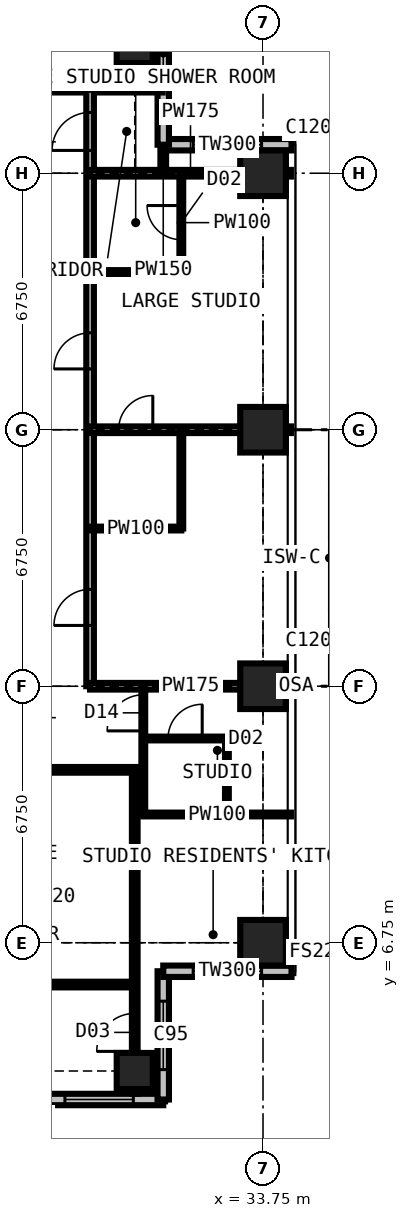
"""IFC4 building model, lengths in metres.
Left out: names, types, materials, properties, quantities, classifications, styles, units other than length and angle.
Written with IfcOpenShell. Run it as: python <this file> out.ifc"""

import sys

from ifc_helpers import new_model, si_unit, direction, frame, frame_2d, origin, origin_2d, place, context, subcontext, project, spatial, rectangle, extrude, element, fill, save


model = new_model("IFC4")
c1 = context("Model", 3, precision=1e-05, world=origin(), true_north=direction((0.0, 1.0)))
c2 = subcontext(c1, "Body", "Model", "MODEL_VIEW")
j1 = project(units=[si_unit("LENGTHUNIT", "METRE"), si_unit("PLANEANGLEUNIT", "RADIAN")], contexts=[c1])
p1 = place(None, origin())
s1 = spatial("IfcSite", under=j1, at=p1, CompositionType="ELEMENT")
p2 = place(p1, origin())
s2 = spatial("IfcBuilding", under=s1, at=p2, CompositionType="ELEMENT")
p3 = place(p2, frame((0.0, 0.0, 174.6)))
s3 = spatial("IfcBuildingStorey", under=s2, at=p3, CompositionType="ELEMENT", Elevation=174.6)
for number, where, z_axis, x_axis in (
    (1, (30.375, 3.375, 0.0), (0.0, 0.0, 1.0), (1.0, 0.0, 0.0)),
    (2, (30.375, 30.375, 0.0), (0.0, 0.0, 1.0), (1.0, 0.0, 0.0)),
):
    element("IfcColumn", number, at=place(p3, frame(where, z_axis=z_axis, x_axis=x_axis)), inside=s3, PredefinedType="COLUMN", context=c2, shape_type="SweptSolid", body=[
        extrude(rectangle(XDim=0.95, YDim=0.95, at=origin_2d()), origin(), (0.0, 0.0, 1.0), 3.6),
    ])
for number, where, z_axis, x_axis in (
    (3, (33.75, 6.75, 0.0), (0.0, 0.0, 1.0), (1.0, 0.0, 0.0)),
    (4, (33.75, 13.5, 0.0), (0.0, 0.0, 1.0), (1.0, 0.0, 0.0)),
    (5, (33.75, 20.25, 0.0), (0.0, 0.0, 1.0), (1.0, 0.0, 0.0)),
    (6, (33.75, 27.0, 0.0), (0.0, 0.0, 1.0), (1.0, 0.0, 0.0)),
):
    element("IfcColumn", number, at=place(p3, frame(where, z_axis=z_axis, x_axis=x_axis)), inside=s3, PredefinedType="COLUMN", context=c2, shape_type="SweptSolid", body=[
        extrude(rectangle(XDim=1.2, YDim=1.2, at=origin_2d()), origin(), (0.0, 0.0, 1.0), 3.6),
    ])
p4 = place(p3, frame((34.5, 27.75, 0.0), z_axis=(0.0, 0.0, 1.0), x_axis=(-1.0, 0.0, 0.0)))
e7 = element("IfcWall", 7, at=p4, inside=s3, PredefinedType="SOLIDWALL", context=c2, shape_type="SweptSolid", body=[
    extrude(rectangle(XDim=3.375, YDim=0.3, at=frame_2d((1.688, 0.0))), origin(), (0.0, 0.0, 1.0), 3.375),
])
p5 = place(p4, frame((0.788, 0.0, 0.6)))
e8 = element("IfcOpeningElement", 8, at=p5, cuts=e7, PredefinedType="OPENING", context=c2, shape_type="SweptSolid", body=[
    extrude(rectangle(XDim=1.8, YDim=2.1, at=frame_2d((0.9, 1.05))), frame((0.0, 0.16, 0.0), z_axis=(0.0, -1.0, 0.0), x_axis=(1.0, 0.0, 0.0)), (0.0, 0.0, 1.0), 0.32),
])
p6 = place(p3, frame((31.125, 27.75, 0.0), z_axis=(0.0, 0.0, 1.0), x_axis=(0.0, 1.0, 0.0)))
e9 = element("IfcWall", 9, at=p6, inside=s3, PredefinedType="SOLIDWALL", context=c2, shape_type="SweptSolid", body=[
    extrude(rectangle(XDim=3.375, YDim=0.3, at=frame_2d((1.688, 0.0))), origin(), (0.0, 0.0, 1.0), 3.375),
])
p7 = place(p6, frame((1.663, 0.0, 0.9)))
e10 = element("IfcOpeningElement", 10, at=p7, cuts=e9, PredefinedType="OPENING", context=c2, shape_type="SweptSolid", body=[
    extrude(rectangle(XDim=1.5, YDim=1.8, at=frame_2d((0.75, 0.9))), frame((0.0, 0.16, 0.0), z_axis=(0.0, -1.0, 0.0), x_axis=(1.0, 0.0, 0.0)), (0.0, 0.0, 1.0), 0.32),
])
p8 = place(p3, frame((27.75, 2.625, 0.0), z_axis=(0.0, 0.0, 1.0), x_axis=(1.0, 0.0, 0.0)))
e11 = element("IfcWall", 11, at=p8, inside=s3, PredefinedType="SOLIDWALL", context=c2, shape_type="SweptSolid", body=[
    extrude(rectangle(XDim=3.375, YDim=0.3, at=frame_2d((1.688, 0.0))), origin(), (0.0, 0.0, 1.0), 3.375),
])
p9 = place(p8, frame((0.788, 0.0, 0.6)))
e12 = element("IfcOpeningElement", 12, at=p9, cuts=e11, PredefinedType="OPENING", context=c2, shape_type="SweptSolid", body=[
    extrude(rectangle(XDim=1.8, YDim=2.1, at=frame_2d((0.9, 1.05))), frame((0.0, 0.16, 0.0), z_axis=(0.0, -1.0, 0.0), x_axis=(1.0, 0.0, 0.0)), (0.0, 0.0, 1.0), 0.32),
])
p10 = place(p3, frame((31.125, 2.625, 0.0), z_axis=(0.0, 0.0, 1.0), x_axis=(0.0, 1.0, 0.0)))
e13 = element("IfcWall", 13, at=p10, inside=s3, PredefinedType="SOLIDWALL", context=c2, shape_type="SweptSolid", body=[
    extrude(rectangle(XDim=3.375, YDim=0.3, at=frame_2d((1.688, 0.0))), origin(), (0.0, 0.0, 1.0), 3.375),
])
p11 = place(p10, frame((0.788, 0.0, 0.6)))
e14 = element("IfcOpeningElement", 14, at=p11, cuts=e13, PredefinedType="OPENING", context=c2, shape_type="SweptSolid", body=[
    extrude(rectangle(XDim=1.8, YDim=2.1, at=frame_2d((0.9, 1.05))), frame((0.0, 0.16, 0.0), z_axis=(0.0, -1.0, 0.0), x_axis=(1.0, 0.0, 0.0)), (0.0, 0.0, 1.0), 0.32),
])
p12 = place(p3, frame((31.125, 6.0, 0.0), z_axis=(0.0, 0.0, 1.0), x_axis=(1.0, 0.0, 0.0)))
e15 = element("IfcWall", 15, at=p12, inside=s3, PredefinedType="SOLIDWALL", context=c2, shape_type="SweptSolid", body=[
    extrude(rectangle(XDim=3.375, YDim=0.3, at=frame_2d((1.688, 0.0))), origin(), (0.0, 0.0, 1.0), 3.375),
])
p13 = place(p12, frame((0.788, 0.0, 0.6)))
e16 = element("IfcOpeningElement", 16, at=p13, cuts=e15, PredefinedType="OPENING", context=c2, shape_type="SweptSolid", body=[
    extrude(rectangle(XDim=1.8, YDim=2.1, at=frame_2d((0.9, 1.05))), frame((0.0, 0.16, 0.0), z_axis=(0.0, -1.0, 0.0), x_axis=(1.0, 0.0, 0.0)), (0.0, 0.0, 1.0), 0.32),
])
p14 = place(p3, frame((10.125, 11.3, 0.0), z_axis=(0.0, 0.0, 1.0), x_axis=(1.0, 0.0, 0.0)))
e17 = element("IfcWall", 17, at=p14, inside=s3, PredefinedType="PARTITIONING", context=c2, shape_type="SweptSolid", body=[
    extrude(rectangle(XDim=20.475, YDim=0.15, at=frame_2d((10.238, 0.0))), origin(), (0.0, 0.0, 1.0), 3.375),
])
p15 = place(p14, frame((8.425, 0.0, 0.0)))
e18 = element("IfcOpeningElement", 18, at=p15, cuts=e17, PredefinedType="OPENING", context=c2, shape_type="SweptSolid", body=[
    extrude(rectangle(XDim=1.0, YDim=2.2, at=frame_2d((0.5, 1.1))), frame((0.0, 0.085, 0.0), z_axis=(0.0, -1.0, 0.0), x_axis=(1.0, 0.0, 0.0)), (0.0, 0.0, 1.0), 0.17),
])
p16 = place(p14, frame((10.975, 0.0, 0.0)))
e19 = element("IfcOpeningElement", 19, at=p16, cuts=e17, PredefinedType="OPENING", context=c2, shape_type="SweptSolid", body=[
    extrude(rectangle(XDim=1.0, YDim=2.2, at=frame_2d((0.5, 1.1))), frame((0.0, 0.085, 0.0), z_axis=(0.0, -1.0, 0.0), x_axis=(1.0, 0.0, 0.0)), (0.0, 0.0, 1.0), 0.17),
])
p17 = place(p14, frame((4.875, 0.0, 0.0)))
e20 = element("IfcOpeningElement", 20, at=p17, cuts=e17, PredefinedType="OPENING", context=c2, shape_type="SweptSolid", body=[
    extrude(rectangle(XDim=0.95, YDim=2.2, at=frame_2d((0.475, 1.1))), frame((0.0, 0.085, 0.0), z_axis=(0.0, -1.0, 0.0), x_axis=(1.0, 0.0, 0.0)), (0.0, 0.0, 1.0), 0.17),
])
p18 = place(p3, frame((11.3, 29.2, 0.0), z_axis=(0.0, 0.0, 1.0), x_axis=(1.0, 0.0, 0.0)))
e21 = element("IfcWall", 21, at=p18, inside=s3, PredefinedType="PARTITIONING", context=c2, shape_type="SweptSolid", body=[
    extrude(rectangle(XDim=19.809, YDim=0.15, at=frame_2d((9.904, 0.0))), origin(), (0.0, 0.0, 1.0), 3.375),
])
p19 = place(p18, frame((12.9, 0.0, 0.0)))
e22 = element("IfcOpeningElement", 22, at=p19, cuts=e21, PredefinedType="OPENING", context=c2, shape_type="SweptSolid", body=[
    extrude(rectangle(XDim=1.0, YDim=2.2, at=frame_2d((0.5, 1.1))), frame((0.0, 0.085, 0.0), z_axis=(0.0, -1.0, 0.0), x_axis=(1.0, 0.0, 0.0)), (0.0, 0.0, 1.0), 0.17),
])
p20 = place(p18, frame((6.4, 0.0, 0.0)))
e23 = element("IfcOpeningElement", 23, at=p20, cuts=e21, PredefinedType="OPENING", context=c2, shape_type="SweptSolid", body=[
    extrude(rectangle(XDim=0.95, YDim=2.2, at=frame_2d((0.475, 1.1))), frame((0.0, 0.085, 0.0), z_axis=(0.0, -1.0, 0.0), x_axis=(1.0, 0.0, 0.0)), (0.0, 0.0, 1.0), 0.17),
])
p21 = place(p18, frame((0.6, 0.0, 0.0)))
e24 = element("IfcOpeningElement", 24, at=p21, cuts=e21, PredefinedType="OPENING", context=c2, shape_type="SweptSolid", body=[
    extrude(rectangle(XDim=1.0, YDim=2.2, at=frame_2d((0.5, 1.1))), frame((0.0, 0.085, 0.0), z_axis=(0.0, -1.0, 0.0), x_axis=(1.0, 0.0, 0.0)), (0.0, 0.0, 1.0), 0.17),
])
p22 = place(p3, frame((22.988, 5.65, 0.0), z_axis=(0.0, 0.0, 1.0), x_axis=(1.0, 0.0, 0.0)))
e25 = element("IfcWall", 25, at=p22, inside=s3, PredefinedType="PARTITIONING", context=c2, shape_type="SweptSolid", body=[
    extrude(rectangle(XDim=7.387, YDim=0.15, at=frame_2d((3.694, 0.0))), origin(), (0.0, 0.0, 1.0), 3.375),
])
p23 = place(p22, frame((2.45, 0.0, 0.0)))
e26 = element("IfcOpeningElement", 26, at=p23, cuts=e25, PredefinedType="OPENING", context=c2, shape_type="SweptSolid", body=[
    extrude(rectangle(XDim=0.95, YDim=2.2, at=frame_2d((0.475, 1.1))), frame((0.0, 0.085, 0.0), z_axis=(0.0, -1.0, 0.0), x_axis=(1.0, 0.0, 0.0)), (0.0, 0.0, 1.0), 0.17),
])
p24 = place(p3, frame((29.2, 13.5, 0.0), z_axis=(0.0, 0.0, 1.0), x_axis=(0.0, 1.0, 0.0)))
e27 = element("IfcWall", 27, at=p24, inside=s3, PredefinedType="PARTITIONING", context=c2, shape_type="SweptSolid", body=[
    extrude(rectangle(XDim=15.7, YDim=0.2, at=frame_2d((7.85, 0.0))), origin(), (0.0, 0.0, 1.0), 3.375),
])
p25 = place(p24, frame((8.35, 0.0, 0.0)))
e28 = element("IfcOpeningElement", 28, at=p25, cuts=e27, PredefinedType="OPENING", context=c2, shape_type="SweptSolid", body=[
    extrude(rectangle(XDim=0.95, YDim=2.2, at=frame_2d((0.475, 1.1))), frame((0.0, 0.11, 0.0), z_axis=(0.0, -1.0, 0.0), x_axis=(1.0, 0.0, 0.0)), (0.0, 0.0, 1.0), 0.22),
])
p26 = place(p24, frame((1.6, 0.0, 0.0)))
e29 = element("IfcOpeningElement", 29, at=p26, cuts=e27, PredefinedType="OPENING", context=c2, shape_type="SweptSolid", body=[
    extrude(rectangle(XDim=0.95, YDim=2.2, at=frame_2d((0.475, 1.1))), frame((0.0, 0.11, 0.0), z_axis=(0.0, -1.0, 0.0), x_axis=(1.0, 0.0, 0.0)), (0.0, 0.0, 1.0), 0.22),
])
p27 = place(p24, frame((14.1, 0.0, 0.0)))
e30 = element("IfcOpeningElement", 30, at=p27, cuts=e27, PredefinedType="OPENING", context=c2, shape_type="SweptSolid", body=[
    extrude(rectangle(XDim=1.0, YDim=2.2, at=frame_2d((0.5, 1.1))), frame((0.0, 0.11, 0.0), z_axis=(0.0, -1.0, 0.0), x_axis=(1.0, 0.0, 0.0)), (0.0, 0.0, 1.0), 0.22),
])
p28 = place(p3, frame((29.2, 13.5, 0.0), z_axis=(0.0, 0.0, 1.0), x_axis=(1.0, 0.0, 0.0)))
e31 = element("IfcWall", 31, at=p28, inside=s3, PredefinedType="PARTITIONING", context=c2, shape_type="SweptSolid", body=[
    extrude(rectangle(XDim=5.284, YDim=0.175, at=frame_2d((2.642, 0.0))), origin(), (0.0, 0.0, 1.0), 2.61),
])
p29 = place(p3, frame((29.2, 17.65, 0.0), z_axis=(0.0, 0.0, 1.0), x_axis=(1.0, 0.0, 0.0)))
e32 = element("IfcWall", 32, at=p29, inside=s3, PredefinedType="PARTITIONING", context=c2, shape_type="SweptSolid", body=[
    extrude(rectangle(XDim=2.4, YDim=0.1, at=frame_2d((1.2, 0.0))), origin(), (0.0, 0.0, 1.0), 3.375),
])
p30 = place(p3, frame((29.2, 20.25, 0.0), z_axis=(0.0, 0.0, 1.0), x_axis=(1.0, 0.0, 0.0)))
e33 = element("IfcWall", 33, at=p30, inside=s3, PredefinedType="PARTITIONING", context=c2, shape_type="SweptSolid", body=[
    extrude(rectangle(XDim=5.284, YDim=0.175, at=frame_2d((2.642, 0.0))), origin(), (0.0, 0.0, 1.0), 2.61),
])
p31 = place(p30, frame((0.75, 0.0, 0.0)))
e34 = element("IfcOpeningElement", 34, at=p31, cuts=e33, PredefinedType="OPENING", context=c2, shape_type="SweptSolid", body=[
    extrude(rectangle(XDim=0.9, YDim=2.2, at=frame_2d((0.45, 1.1))), frame((0.0, 0.097, 0.0), z_axis=(0.0, -1.0, 0.0), x_axis=(1.0, 0.0, 0.0)), (0.0, 0.0, 1.0), 0.195),
])
p32 = place(p3, frame((29.2, 24.4, 0.0), z_axis=(0.0, 0.0, 1.0), x_axis=(1.0, 0.0, 0.0)))
e35 = element("IfcWall", 35, at=p32, inside=s3, PredefinedType="PARTITIONING", context=c2, shape_type="SweptSolid", body=[
    extrude(rectangle(XDim=2.4, YDim=0.1, at=frame_2d((1.2, 0.0))), origin(), (0.0, 0.0, 1.0), 3.375),
])
p33 = place(p3, frame((29.2, 27.0, 0.0), z_axis=(0.0, 0.0, 1.0), x_axis=(1.0, 0.0, 0.0)))
e36 = element("IfcWall", 36, at=p33, inside=s3, PredefinedType="PARTITIONING", context=c2, shape_type="SweptSolid", body=[
    extrude(rectangle(XDim=5.284, YDim=0.175, at=frame_2d((2.642, 0.0))), origin(), (0.0, 0.0, 1.0), 2.806),
])
p34 = place(p3, frame((30.375, 2.775, 0.0), z_axis=(0.0, 0.0, 1.0), x_axis=(0.0, 1.0, 0.0)))
e37 = element("IfcWall", 37, at=p34, inside=s3, PredefinedType="PARTITIONING", context=c2, shape_type="SweptSolid", body=[
    extrude(rectangle(XDim=8.525, YDim=0.15, at=frame_2d((4.263, 0.0))), origin(), (0.0, 0.0, 1.0), 2.877),
])
p35 = place(p34, frame((1.116, 0.0, 0.0)))
e38 = element("IfcOpeningElement", 38, at=p35, cuts=e37, PredefinedType="OPENING", context=c2, shape_type="SweptSolid", body=[
    extrude(rectangle(XDim=1.0, YDim=2.2, at=frame_2d((0.5, 1.1))), frame((0.0, 0.085, 0.0), z_axis=(0.0, -1.0, 0.0), x_axis=(1.0, 0.0, 0.0)), (0.0, 0.0, 1.0), 0.17),
])
p36 = place(p3, frame((30.6, 10.125, 0.0), z_axis=(0.0, 0.0, 1.0), x_axis=(0.0, 1.0, 0.0)))
e39 = element("IfcWall", 39, at=p36, inside=s3, PredefinedType="PARTITIONING", context=c2, shape_type="SweptSolid", body=[
    extrude(rectangle(XDim=3.375, YDim=0.1, at=frame_2d((1.688, 0.0))), origin(), (0.0, 0.0, 1.0), 3.375),
])
p37 = place(p36, frame((2.2, 0.0, 0.0)))
e40 = element("IfcOpeningElement", 40, at=p37, cuts=e39, PredefinedType="OPENING", context=c2, shape_type="SweptSolid", body=[
    extrude(rectangle(XDim=0.95, YDim=2.2, at=frame_2d((0.475, 1.1))), frame((0.0, 0.06, 0.0), z_axis=(0.0, -1.0, 0.0), x_axis=(1.0, 0.0, 0.0)), (0.0, 0.0, 1.0), 0.12),
])
p38 = place(p3, frame((30.6, 10.125, 0.0), z_axis=(0.0, 0.0, 1.0), x_axis=(1.0, 0.0, 0.0)))
e41 = element("IfcWall", 41, at=p38, inside=s3, PredefinedType="PARTITIONING", context=c2, shape_type="SweptSolid", body=[
    extrude(rectangle(XDim=3.884, YDim=0.1, at=frame_2d((1.942, 0.0))), origin(), (0.0, 0.0, 1.0), 3.375),
])
p39 = place(p3, frame((30.6, 12.125, 0.0), z_axis=(0.0, 0.0, 1.0), x_axis=(1.0, 0.0, 0.0)))
e42 = element("IfcWall", 42, at=p39, inside=s3, PredefinedType="PARTITIONING", context=c2, shape_type="SweptSolid", body=[
    extrude(rectangle(XDim=2.2, YDim=0.1, at=frame_2d((1.1, 0.0))), origin(), (0.0, 0.0, 1.0), 3.375),
])
p40 = place(p39, frame((0.65, 0.0, 0.0)))
e43 = element("IfcOpeningElement", 43, at=p40, cuts=e42, PredefinedType="OPENING", context=c2, shape_type="SweptSolid", body=[
    extrude(rectangle(XDim=0.9, YDim=2.2, at=frame_2d((0.45, 1.1))), frame((0.0, 0.06, 0.0), z_axis=(0.0, -1.0, 0.0), x_axis=(1.0, 0.0, 0.0)), (0.0, 0.0, 1.0), 0.12),
])
p41 = place(p3, frame((31.125, 27.0, 0.0), z_axis=(0.0, 0.0, 1.0), x_axis=(0.0, 1.0, 0.0)))
e44 = element("IfcWall", 44, at=p41, inside=s3, PredefinedType="PARTITIONING", context=c2, shape_type="SweptSolid", body=[
    extrude(rectangle(XDim=0.734, YDim=0.15, at=frame_2d((0.367, 0.0))), origin(), (0.0, 0.0, 1.0), 3.375),
])
p42 = place(p3, frame((31.6, 17.65, 0.0), z_axis=(0.0, 0.0, 1.0), x_axis=(0.0, 1.0, 0.0)))
e45 = element("IfcWall", 45, at=p42, inside=s3, PredefinedType="PARTITIONING", context=c2, shape_type="SweptSolid", body=[
    extrude(rectangle(XDim=2.6, YDim=0.1, at=frame_2d((1.3, 0.0))), origin(), (0.0, 0.0, 1.0), 3.375),
])
p43 = place(p3, frame((31.6, 24.4, 0.0), z_axis=(0.0, 0.0, 1.0), x_axis=(0.0, 1.0, 0.0)))
e46 = element("IfcWall", 46, at=p43, inside=s3, PredefinedType="PARTITIONING", context=c2, shape_type="SweptSolid", body=[
    extrude(rectangle(XDim=2.6, YDim=0.1, at=frame_2d((1.3, 0.0))), origin(), (0.0, 0.0, 1.0), 3.375),
])
p44 = place(p43, frame((0.85, 0.0, 0.0)))
e47 = element("IfcOpeningElement", 47, at=p44, cuts=e46, PredefinedType="OPENING", context=c2, shape_type="SweptSolid", body=[
    extrude(rectangle(XDim=0.9, YDim=2.2, at=frame_2d((0.45, 1.1))), frame((0.0, 0.06, 0.0), z_axis=(0.0, -1.0, 0.0), x_axis=(1.0, 0.0, 0.0)), (0.0, 0.0, 1.0), 0.12),
])
p45 = place(p3, frame((32.8, 10.125, 0.0), z_axis=(0.0, 0.0, 1.0), x_axis=(0.0, 1.0, 0.0)))
e48 = element("IfcWall", 48, at=p45, inside=s3, PredefinedType="PARTITIONING", context=c2, shape_type="SweptSolid", body=[
    extrude(rectangle(XDim=2.0, YDim=0.1, at=frame_2d((1.0, 0.0))), origin(), (0.0, 0.0, 1.0), 3.375),
])
p46 = place(p5, origin())
e49 = element("IfcWindow", 49, at=p46, inside=s3, PartitioningType="SINGLE_PANEL", PredefinedType="WINDOW", context=c2, shape_type="SweptSolid", body=[
    extrude(rectangle(XDim=1.8, YDim=2.1, at=frame_2d((0.9, 1.05))), frame((0.0, 0.03, 0.0), z_axis=(0.0, -1.0, 0.0), x_axis=(1.0, 0.0, 0.0)), (0.0, 0.0, 1.0), 0.06),
])
fill(e8, e49)
p47 = place(p7, origin())
e50 = element("IfcWindow", 50, at=p47, inside=s3, PartitioningType="SINGLE_PANEL", PredefinedType="WINDOW", context=c2, shape_type="SweptSolid", body=[
    extrude(rectangle(XDim=1.5, YDim=1.8, at=frame_2d((0.75, 0.9))), frame((0.0, 0.03, 0.0), z_axis=(0.0, -1.0, 0.0), x_axis=(1.0, 0.0, 0.0)), (0.0, 0.0, 1.0), 0.06),
])
fill(e10, e50)
p48 = place(p9, origin())
e51 = element("IfcWindow", 51, at=p48, inside=s3, PartitioningType="SINGLE_PANEL", PredefinedType="WINDOW", context=c2, shape_type="SweptSolid", body=[
    extrude(rectangle(XDim=1.8, YDim=2.1, at=frame_2d((0.9, 1.05))), frame((0.0, 0.03, 0.0), z_axis=(0.0, -1.0, 0.0), x_axis=(1.0, 0.0, 0.0)), (0.0, 0.0, 1.0), 0.06),
])
fill(e12, e51)
p49 = place(p11, origin())
e52 = element("IfcWindow", 52, at=p49, inside=s3, PartitioningType="SINGLE_PANEL", PredefinedType="WINDOW", context=c2, shape_type="SweptSolid", body=[
    extrude(rectangle(XDim=1.8, YDim=2.1, at=frame_2d((0.9, 1.05))), frame((0.0, 0.03, 0.0), z_axis=(0.0, -1.0, 0.0), x_axis=(1.0, 0.0, 0.0)), (0.0, 0.0, 1.0), 0.06),
])
fill(e14, e52)
p50 = place(p13, origin())
e53 = element("IfcWindow", 53, at=p50, inside=s3, PartitioningType="SINGLE_PANEL", PredefinedType="WINDOW", context=c2, shape_type="SweptSolid", body=[
    extrude(rectangle(XDim=1.8, YDim=2.1, at=frame_2d((0.9, 1.05))), frame((0.0, 0.03, 0.0), z_axis=(0.0, -1.0, 0.0), x_axis=(1.0, 0.0, 0.0)), (0.0, 0.0, 1.0), 0.06),
])
fill(e16, e53)
p51 = place(p35, origin())
e54 = element("IfcDoor", 54, at=p51, inside=s3, OperationType="SINGLE_SWING_LEFT", PredefinedType="DOOR", context=c2, shape_type="SweptSolid", body=[
    extrude(rectangle(XDim=1.0, YDim=2.2, at=frame_2d((0.5, 1.1))), frame((0.0, 0.025, 0.0), z_axis=(0.0, -1.0, 0.0), x_axis=(1.0, 0.0, 0.0)), (0.0, 0.0, 1.0), 0.05),
])
fill(e38, e54)
p52 = place(p25, origin())
e55 = element("IfcDoor", 55, at=p52, inside=s3, OperationType="SINGLE_SWING_LEFT", PredefinedType="DOOR", context=c2, shape_type="SweptSolid", body=[
    extrude(rectangle(XDim=0.95, YDim=2.2, at=frame_2d((0.475, 1.1))), frame((0.0, 0.025, 0.0), z_axis=(0.0, -1.0, 0.0), x_axis=(1.0, 0.0, 0.0)), (0.0, 0.0, 1.0), 0.05),
])
fill(e28, e55)
p53 = place(p44, origin())
e56 = element("IfcDoor", 56, at=p53, inside=s3, OperationType="SINGLE_SWING_RIGHT", PredefinedType="DOOR", context=c2, shape_type="SweptSolid", body=[
    extrude(rectangle(XDim=0.9, YDim=2.2, at=frame_2d((0.45, 1.1))), frame((0.0, 0.025, 0.0), z_axis=(0.0, -1.0, 0.0), x_axis=(1.0, 0.0, 0.0)), (0.0, 0.0, 1.0), 0.05),
])
fill(e47, e56)
p54 = place(p26, origin())
e57 = element("IfcDoor", 57, at=p54, inside=s3, OperationType="SINGLE_SWING_LEFT", PredefinedType="DOOR", context=c2, shape_type="SweptSolid", body=[
    extrude(rectangle(XDim=0.95, YDim=2.2, at=frame_2d((0.475, 1.1))), frame((0.0, 0.025, 0.0), z_axis=(0.0, -1.0, 0.0), x_axis=(1.0, 0.0, 0.0)), (0.0, 0.0, 1.0), 0.05),
])
fill(e29, e57)
p55 = place(p31, origin())
e58 = element("IfcDoor", 58, at=p55, inside=s3, OperationType="SINGLE_SWING_RIGHT", PredefinedType="DOOR", context=c2, shape_type="SweptSolid", body=[
    extrude(rectangle(XDim=0.9, YDim=2.2, at=frame_2d((0.45, 1.1))), frame((0.0, 0.025, 0.0), z_axis=(0.0, -1.0, 0.0), x_axis=(1.0, 0.0, 0.0)), (0.0, 0.0, 1.0), 0.05),
])
fill(e34, e58)
p56 = place(p37, origin())
e59 = element("IfcDoor", 59, at=p56, inside=s3, OperationType="SINGLE_SWING_LEFT", PredefinedType="DOOR", context=c2, shape_type="SweptSolid", body=[
    extrude(rectangle(XDim=0.95, YDim=2.2, at=frame_2d((0.475, 1.1))), frame((0.0, 0.025, 0.0), z_axis=(0.0, -1.0, 0.0), x_axis=(1.0, 0.0, 0.0)), (0.0, 0.0, 1.0), 0.05),
])
fill(e40, e59)
p57 = place(p40, origin())
e60 = element("IfcDoor", 60, at=p57, inside=s3, OperationType="SINGLE_SWING_RIGHT", PredefinedType="DOOR", context=c2, shape_type="SweptSolid", body=[
    extrude(rectangle(XDim=0.9, YDim=2.2, at=frame_2d((0.45, 1.1))), frame((0.0, 0.025, 0.0), z_axis=(0.0, -1.0, 0.0), x_axis=(1.0, 0.0, 0.0)), (0.0, 0.0, 1.0), 0.05),
])
fill(e43, e60)
p58 = place(p27, origin())
e61 = element("IfcDoor", 61, at=p58, inside=s3, OperationType="SINGLE_SWING_LEFT", PredefinedType="DOOR", context=c2, shape_type="SweptSolid", body=[
    extrude(rectangle(XDim=1.0, YDim=2.2, at=frame_2d((0.5, 1.1))), frame((0.0, 0.025, 0.0), z_axis=(0.0, -1.0, 0.0), x_axis=(1.0, 0.0, 0.0)), (0.0, 0.0, 1.0), 0.05),
])
fill(e30, e61)
save(model, sys.argv[1])
